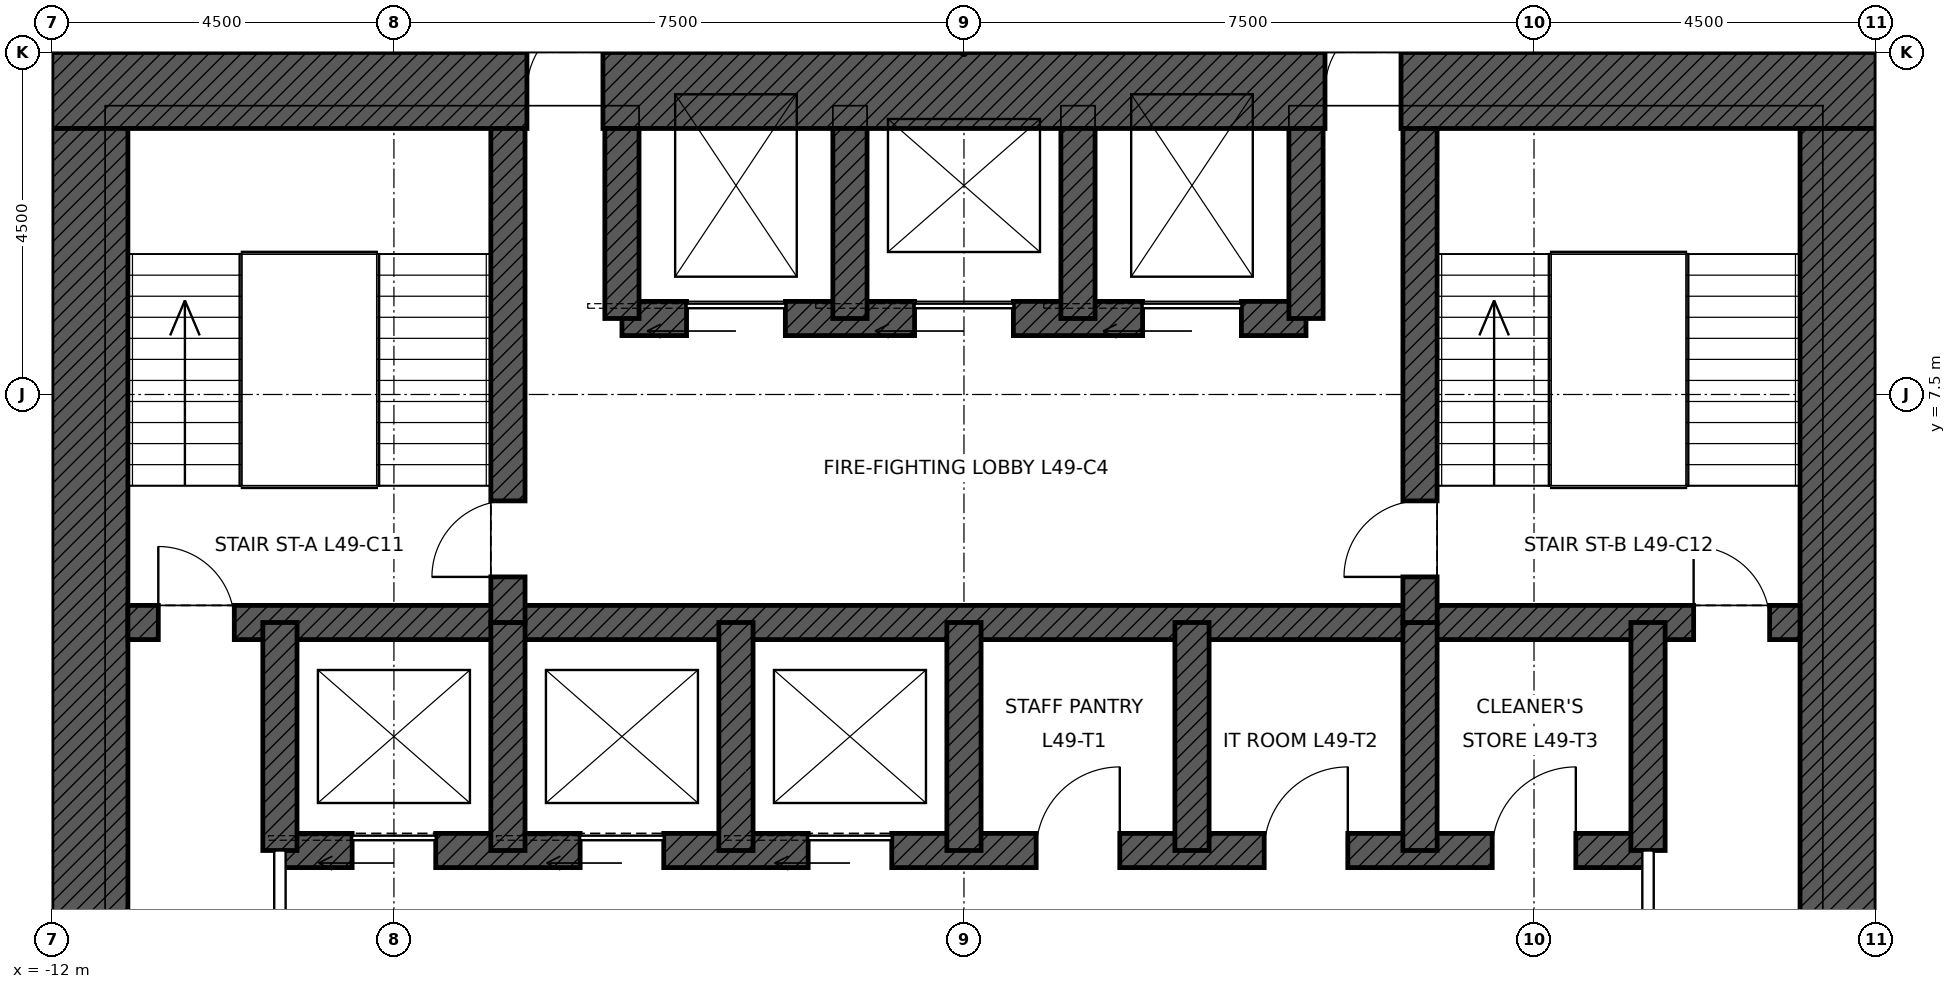
"""IFC4 building model, lengths in metres.
Left out: names, types, materials, properties, quantities, classifications, styles, units other than length and angle.
Written with IfcOpenShell. Run it as: python <this file> out.ifc"""

import sys

from ifc_helpers import new_model, si_unit, direction, frame, frame_2d, origin, place, context, subcontext, project, spatial, rectangle, extrude, element, fill, save


model = new_model("IFC4")
c1 = context("Model", 3, precision=1e-05, world=origin(), true_north=direction((0.0, 1.0)))
c2 = subcontext(c1, "Body", "Model", "MODEL_VIEW")
j1 = project(units=[si_unit("LENGTHUNIT", "METRE"), si_unit("PLANEANGLEUNIT", "RADIAN")], contexts=[c1])
p1 = place(None, origin())
s1 = spatial("IfcSite", under=j1, at=p1, CompositionType="ELEMENT")
p2 = place(p1, origin())
s2 = spatial("IfcBuilding", under=s1, at=p2, CompositionType="ELEMENT")
p3 = place(p2, frame((0.0, 0.0, 229.9)))
s3 = spatial("IfcBuildingStorey", under=s2, at=p3, CompositionType="ELEMENT", Elevation=229.9)
p4 = place(p3, frame((-12.0, 11.5, 0.0), z_axis=(0.0, 0.0, 1.0), x_axis=(1.0, 0.0, 0.0)))
e1 = element("IfcWall", 1, at=p4, inside=s3, PredefinedType="SHEAR", context=c2, shape_type="SweptSolid", body=[
    extrude(rectangle(XDim=24.0, YDim=1.0, at=frame_2d((12.0, 0.0))), origin(), (0.0, 0.0, 1.0), 4.0),
])
p5 = place(p4, frame((6.25, 0.0, 0.0)))
e2 = element("IfcOpeningElement", 2, at=p5, cuts=e1, PredefinedType="OPENING", context=c2, shape_type="SweptSolid", body=[
    extrude(rectangle(XDim=1.0, YDim=2.4, at=frame_2d((0.5, 1.2))), frame((0.0, 0.51, 0.0), z_axis=(0.0, -1.0, 0.0), x_axis=(1.0, 0.0, 0.0)), (0.0, 0.0, 1.0), 1.02),
])
p6 = place(p4, frame((16.75, 0.0, 0.0)))
e3 = element("IfcOpeningElement", 3, at=p6, cuts=e1, PredefinedType="OPENING", context=c2, shape_type="SweptSolid", body=[
    extrude(rectangle(XDim=1.0, YDim=2.4, at=frame_2d((0.5, 1.2))), frame((0.0, 0.51, 0.0), z_axis=(0.0, -1.0, 0.0), x_axis=(1.0, 0.0, 0.0)), (0.0, 0.0, 1.0), 1.02),
])
p7 = place(p3, frame((11.5, 11.0, 0.0), z_axis=(0.0, 0.0, 1.0), x_axis=(0.0, -1.0, 0.0)))
e4 = element("IfcWall", 4, at=p7, inside=s3, PredefinedType="SHEAR", context=c2, shape_type="SweptSolid", body=[
    extrude(rectangle(XDim=22.0, YDim=1.0, at=frame_2d((11.0, 0.0))), origin(), (0.0, 0.0, 1.0), 4.0),
])
p8 = place(p7, frame((10.5, 0.0, 0.0)))
e5 = element("IfcOpeningElement", 5, at=p8, cuts=e4, PredefinedType="OPENING", context=c2, shape_type="SweptSolid", body=[
    extrude(rectangle(XDim=1.0, YDim=2.4, at=frame_2d((0.5, 1.2))), frame((0.0, 0.51, 0.0), z_axis=(0.0, -1.0, 0.0), x_axis=(1.0, 0.0, 0.0)), (0.0, 0.0, 1.0), 1.02),
])
p9 = place(p3, frame((-11.5, -11.0, 0.0), z_axis=(0.0, 0.0, 1.0), x_axis=(0.0, 1.0, 0.0)))
e6 = element("IfcWall", 6, at=p9, inside=s3, PredefinedType="SHEAR", context=c2, shape_type="SweptSolid", body=[
    extrude(rectangle(XDim=22.0, YDim=1.0, at=frame_2d((11.0, 0.0))), origin(), (0.0, 0.0, 1.0), 4.0),
])
p10 = place(p9, frame((10.5, 0.0, 0.0)))
e7 = element("IfcOpeningElement", 7, at=p10, cuts=e6, PredefinedType="OPENING", context=c2, shape_type="SweptSolid", body=[
    extrude(rectangle(XDim=1.0, YDim=2.4, at=frame_2d((0.5, 1.2))), frame((0.0, 0.51, 0.0), z_axis=(0.0, -1.0, 0.0), x_axis=(1.0, 0.0, 0.0)), (0.0, 0.0, 1.0), 1.02),
])
p11 = place(p3, frame((-11.0, 4.5, 0.0), z_axis=(0.0, 0.0, 1.0), x_axis=(1.0, 0.0, 0.0)))
e8 = element("IfcWall", 8, at=p11, inside=s3, PredefinedType="SHEAR", context=c2, shape_type="SweptSolid", body=[
    extrude(rectangle(XDim=22.0, YDim=0.45, at=frame_2d((11.0, 0.0))), origin(), (0.0, 0.0, 1.0), 4.0),
])
p12 = place(p11, frame((0.4, 0.0, 0.0)))
e9 = element("IfcOpeningElement", 9, at=p12, cuts=e8, PredefinedType="OPENING", context=c2, shape_type="SweptSolid", body=[
    extrude(rectangle(XDim=1.0, YDim=2.1, at=frame_2d((0.5, 1.05))), frame((0.0, 0.235, 0.0), z_axis=(0.0, -1.0, 0.0), x_axis=(1.0, 0.0, 0.0)), (0.0, 0.0, 1.0), 0.47),
])
p13 = place(p11, frame((20.6, 0.0, 0.0)))
e10 = element("IfcOpeningElement", 10, at=p13, cuts=e8, PredefinedType="OPENING", context=c2, shape_type="SweptSolid", body=[
    extrude(rectangle(XDim=1.0, YDim=2.1, at=frame_2d((0.5, 1.05))), frame((0.0, 0.235, 0.0), z_axis=(0.0, -1.0, 0.0), x_axis=(1.0, 0.0, 0.0)), (0.0, 0.0, 1.0), 0.47),
])
p14 = place(p3, frame((-9.0, 1.5, 0.0), z_axis=(0.0, 0.0, 1.0), x_axis=(1.0, 0.0, 0.0)))
e11 = element("IfcWall", 11, at=p14, inside=s3, PredefinedType="SHEAR", context=c2, shape_type="SweptSolid", body=[
    extrude(rectangle(XDim=18.0, YDim=0.45, at=frame_2d((9.0, 0.0))), origin(), (0.0, 0.0, 1.0), 4.0),
])
p15 = place(p14, frame((0.95, 0.0, 0.0)))
e12 = element("IfcOpeningElement", 12, at=p15, cuts=e11, PredefinedType="OPENING", context=c2, shape_type="SweptSolid", body=[
    extrude(rectangle(XDim=1.1, YDim=2.1, at=frame_2d((0.55, 1.05))), frame((0.0, 0.235, 0.0), z_axis=(0.0, -1.0, 0.0), x_axis=(1.0, 0.0, 0.0)), (0.0, 0.0, 1.0), 0.47),
])
p16 = place(p14, frame((3.95, 0.0, 0.0)))
e13 = element("IfcOpeningElement", 13, at=p16, cuts=e11, PredefinedType="OPENING", context=c2, shape_type="SweptSolid", body=[
    extrude(rectangle(XDim=1.1, YDim=2.1, at=frame_2d((0.55, 1.05))), frame((0.0, 0.235, 0.0), z_axis=(0.0, -1.0, 0.0), x_axis=(1.0, 0.0, 0.0)), (0.0, 0.0, 1.0), 0.47),
])
p17 = place(p14, frame((6.95, 0.0, 0.0)))
e14 = element("IfcOpeningElement", 14, at=p17, cuts=e11, PredefinedType="OPENING", context=c2, shape_type="SweptSolid", body=[
    extrude(rectangle(XDim=1.1, YDim=2.1, at=frame_2d((0.55, 1.05))), frame((0.0, 0.235, 0.0), z_axis=(0.0, -1.0, 0.0), x_axis=(1.0, 0.0, 0.0)), (0.0, 0.0, 1.0), 0.47),
])
p18 = place(p14, frame((9.95, 0.0, 0.0)))
e15 = element("IfcOpeningElement", 15, at=p18, cuts=e11, PredefinedType="OPENING", context=c2, shape_type="SweptSolid", body=[
    extrude(rectangle(XDim=1.1, YDim=2.1, at=frame_2d((0.55, 1.05))), frame((0.0, 0.235, 0.0), z_axis=(0.0, -1.0, 0.0), x_axis=(1.0, 0.0, 0.0)), (0.0, 0.0, 1.0), 0.47),
])
p19 = place(p14, frame((12.95, 0.0, 0.0)))
e16 = element("IfcOpeningElement", 16, at=p19, cuts=e11, PredefinedType="OPENING", context=c2, shape_type="SweptSolid", body=[
    extrude(rectangle(XDim=1.1, YDim=2.1, at=frame_2d((0.55, 1.05))), frame((0.0, 0.235, 0.0), z_axis=(0.0, -1.0, 0.0), x_axis=(1.0, 0.0, 0.0)), (0.0, 0.0, 1.0), 0.47),
])
p20 = place(p14, frame((15.95, 0.0, 0.0)))
e17 = element("IfcOpeningElement", 17, at=p20, cuts=e11, PredefinedType="OPENING", context=c2, shape_type="SweptSolid", body=[
    extrude(rectangle(XDim=1.1, YDim=2.1, at=frame_2d((0.55, 1.05))), frame((0.0, 0.235, 0.0), z_axis=(0.0, -1.0, 0.0), x_axis=(1.0, 0.0, 0.0)), (0.0, 0.0, 1.0), 0.47),
])
p21 = place(p3, frame((-4.5, 8.5, 0.0), z_axis=(0.0, 0.0, 1.0), x_axis=(1.0, 0.0, 0.0)))
e18 = element("IfcWall", 18, at=p21, inside=s3, PredefinedType="SHEAR", context=c2, shape_type="SweptSolid", body=[
    extrude(rectangle(XDim=9.0, YDim=0.45, at=frame_2d((4.5, 0.0))), origin(), (0.0, 0.0, 1.0), 4.0),
])
p22 = place(p21, frame((0.85, 0.0, 0.0)))
e19 = element("IfcOpeningElement", 19, at=p22, cuts=e18, PredefinedType="OPENING", context=c2, shape_type="SweptSolid", body=[
    extrude(rectangle(XDim=1.3, YDim=2.4, at=frame_2d((0.65, 1.2))), frame((0.0, 0.235, 0.0), z_axis=(0.0, -1.0, 0.0), x_axis=(1.0, 0.0, 0.0)), (0.0, 0.0, 1.0), 0.47),
])
p23 = place(p21, frame((6.85, 0.0, 0.0)))
e20 = element("IfcOpeningElement", 20, at=p23, cuts=e18, PredefinedType="OPENING", context=c2, shape_type="SweptSolid", body=[
    extrude(rectangle(XDim=1.3, YDim=2.4, at=frame_2d((0.65, 1.2))), frame((0.0, 0.235, 0.0), z_axis=(0.0, -1.0, 0.0), x_axis=(1.0, 0.0, 0.0)), (0.0, 0.0, 1.0), 0.47),
])
p24 = place(p21, frame((3.85, 0.0, 0.0)))
e21 = element("IfcOpeningElement", 21, at=p24, cuts=e18, PredefinedType="OPENING", context=c2, shape_type="SweptSolid", body=[
    extrude(rectangle(XDim=1.3, YDim=2.4, at=frame_2d((0.65, 1.2))), frame((0.0, 0.235, 0.0), z_axis=(0.0, -1.0, 0.0), x_axis=(1.0, 0.0, 0.0)), (0.0, 0.0, 1.0), 0.47),
])
for number, where, z_axis, x_axis in (
    (22, (-9.0, 1.5, 0.0), (0.0, 0.0, 1.0), (0.0, 1.0, 0.0)),
    (23, (9.0, 1.5, 0.0), (0.0, 0.0, 1.0), (0.0, 1.0, 0.0)),
    (24, (-6.0, 1.5, 0.0), (0.0, 0.0, 1.0), (0.0, 1.0, 0.0)),
    (25, (-3.0, 1.5, 0.0), (0.0, 0.0, 1.0), (0.0, 1.0, 0.0)),
    (26, (0.0, 1.5, 0.0), (0.0, 0.0, 1.0), (0.0, 1.0, 0.0)),
    (27, (3.0, 1.5, 0.0), (0.0, 0.0, 1.0), (0.0, 1.0, 0.0)),
    (28, (6.0, 1.5, 0.0), (0.0, 0.0, 1.0), (0.0, 1.0, 0.0)),
):
    element("IfcWall", number, at=place(p3, frame(where, z_axis=z_axis, x_axis=x_axis)), inside=s3, PredefinedType="SHEAR", context=c2, shape_type="SweptSolid", body=[
        extrude(rectangle(XDim=3.0, YDim=0.45, at=frame_2d((1.5, 0.0))), origin(), (0.0, 0.0, 1.0), 4.0),
    ])
p25 = place(p3, frame((-6.0, 4.5, 0.0), z_axis=(0.0, 0.0, 1.0), x_axis=(0.0, 1.0, 0.0)))
e29 = element("IfcWall", 29, at=p25, inside=s3, PredefinedType="SHEAR", context=c2, shape_type="SweptSolid", body=[
    extrude(rectangle(XDim=6.5, YDim=0.45, at=frame_2d((3.25, 0.0))), origin(), (0.0, 0.0, 1.0), 4.0),
])
p26 = place(p25, frame((0.6, 0.0, 0.0)))
e30 = element("IfcOpeningElement", 30, at=p26, cuts=e29, PredefinedType="OPENING", context=c2, shape_type="SweptSolid", body=[
    extrude(rectangle(XDim=1.0, YDim=2.1, at=frame_2d((0.5, 1.05))), frame((0.0, 0.235, 0.0), z_axis=(0.0, -1.0, 0.0), x_axis=(1.0, 0.0, 0.0)), (0.0, 0.0, 1.0), 0.47),
])
p27 = place(p3, frame((6.0, 4.5, 0.0), z_axis=(0.0, 0.0, 1.0), x_axis=(0.0, 1.0, 0.0)))
e31 = element("IfcWall", 31, at=p27, inside=s3, PredefinedType="SHEAR", context=c2, shape_type="SweptSolid", body=[
    extrude(rectangle(XDim=6.5, YDim=0.45, at=frame_2d((3.25, 0.0))), origin(), (0.0, 0.0, 1.0), 4.0),
])
p28 = place(p27, frame((0.6, 0.0, 0.0)))
e32 = element("IfcOpeningElement", 32, at=p28, cuts=e31, PredefinedType="OPENING", context=c2, shape_type="SweptSolid", body=[
    extrude(rectangle(XDim=1.0, YDim=2.1, at=frame_2d((0.5, 1.05))), frame((0.0, 0.235, 0.0), z_axis=(0.0, -1.0, 0.0), x_axis=(1.0, 0.0, 0.0)), (0.0, 0.0, 1.0), 0.47),
])
for number, where, z_axis, x_axis in (
    (33, (-4.5, 8.5, 0.0), (0.0, 0.0, 1.0), (0.0, 1.0, 0.0)),
    (34, (4.5, 8.5, 0.0), (0.0, 0.0, 1.0), (0.0, 1.0, 0.0)),
    (35, (-1.5, 8.5, 0.0), (0.0, 0.0, 1.0), (0.0, 1.0, 0.0)),
    (36, (1.5, 8.5, 0.0), (0.0, 0.0, 1.0), (0.0, 1.0, 0.0)),
):
    element("IfcWall", number, at=place(p3, frame(where, z_axis=z_axis, x_axis=x_axis)), inside=s3, PredefinedType="SHEAR", context=c2, shape_type="SweptSolid", body=[
        extrude(rectangle(XDim=2.5, YDim=0.45, at=frame_2d((1.25, 0.0))), origin(), (0.0, 0.0, 1.0), 4.0),
    ])
p29 = place(p3, frame((-9.0, -1.5, 0.0), z_axis=(0.0, 0.0, 1.0), x_axis=(0.0, 1.0, 0.0)))
e37 = element("IfcWall", 37, at=p29, inside=s3, PredefinedType="PARTITIONING", context=c2, shape_type="SweptSolid", body=[
    extrude(rectangle(XDim=3.0, YDim=0.15, at=frame_2d((1.5, 0.0))), origin(), (0.0, 0.0, 1.0), 3.75),
])
p30 = place(p29, frame((1.0, 0.0, 0.0)))
e38 = element("IfcOpeningElement", 38, at=p30, cuts=e37, PredefinedType="OPENING", context=c2, shape_type="SweptSolid", body=[
    extrude(rectangle(XDim=1.0, YDim=2.4, at=frame_2d((0.5, 1.2))), frame((0.0, 0.085, 0.0), z_axis=(0.0, -1.0, 0.0), x_axis=(1.0, 0.0, 0.0)), (0.0, 0.0, 1.0), 0.17),
])
p31 = place(p3, frame((9.0, -1.5, 0.0), z_axis=(0.0, 0.0, 1.0), x_axis=(0.0, 1.0, 0.0)))
e39 = element("IfcWall", 39, at=p31, inside=s3, PredefinedType="PARTITIONING", context=c2, shape_type="SweptSolid", body=[
    extrude(rectangle(XDim=3.0, YDim=0.15, at=frame_2d((1.5, 0.0))), origin(), (0.0, 0.0, 1.0), 3.75),
])
p32 = place(p31, frame((1.0, 0.0, 0.0)))
e40 = element("IfcOpeningElement", 40, at=p32, cuts=e39, PredefinedType="OPENING", context=c2, shape_type="SweptSolid", body=[
    extrude(rectangle(XDim=1.0, YDim=2.4, at=frame_2d((0.5, 1.2))), frame((0.0, 0.085, 0.0), z_axis=(0.0, -1.0, 0.0), x_axis=(1.0, 0.0, 0.0)), (0.0, 0.0, 1.0), 0.17),
])
p33 = place(p12, origin())
e41 = element("IfcDoor", 41, at=p33, inside=s3, OperationType="SINGLE_SWING_LEFT", PredefinedType="DOOR", context=c2, shape_type="SweptSolid", body=[
    extrude(rectangle(XDim=1.0, YDim=2.1, at=frame_2d((0.5, 1.05))), frame((0.0, 0.025, 0.0), z_axis=(0.0, -1.0, 0.0), x_axis=(1.0, 0.0, 0.0)), (0.0, 0.0, 1.0), 0.05),
])
fill(e9, e41)
p34 = place(p13, origin())
e42 = element("IfcDoor", 42, at=p34, inside=s3, OperationType="SINGLE_SWING_LEFT", PredefinedType="DOOR", context=c2, shape_type="SweptSolid", body=[
    extrude(rectangle(XDim=1.0, YDim=2.1, at=frame_2d((0.5, 1.05))), frame((0.0, 0.025, 0.0), z_axis=(0.0, -1.0, 0.0), x_axis=(1.0, 0.0, 0.0)), (0.0, 0.0, 1.0), 0.05),
])
fill(e10, e42)
p35 = place(p26, origin())
e43 = element("IfcDoor", 43, at=p35, inside=s3, OperationType="SINGLE_SWING_LEFT", PredefinedType="DOOR", context=c2, shape_type="SweptSolid", body=[
    extrude(rectangle(XDim=1.0, YDim=2.1, at=frame_2d((0.5, 1.05))), frame((0.0, 0.025, 0.0), z_axis=(0.0, -1.0, 0.0), x_axis=(1.0, 0.0, 0.0)), (0.0, 0.0, 1.0), 0.05),
])
fill(e30, e43)
p36 = place(p28, origin())
e44 = element("IfcDoor", 44, at=p36, inside=s3, OperationType="SINGLE_SWING_LEFT", PredefinedType="DOOR", context=c2, shape_type="SweptSolid", body=[
    extrude(rectangle(XDim=1.0, YDim=2.1, at=frame_2d((0.5, 1.05))), frame((0.0, 0.025, 0.0), z_axis=(0.0, -1.0, 0.0), x_axis=(1.0, 0.0, 0.0)), (0.0, 0.0, 1.0), 0.05),
])
fill(e32, e44)
p37 = place(p5, origin())
e45 = element("IfcDoor", 45, at=p37, inside=s3, OperationType="SINGLE_SWING_RIGHT", PredefinedType="DOOR", context=c2, shape_type="SweptSolid", body=[
    extrude(rectangle(XDim=1.0, YDim=2.4, at=frame_2d((0.5, 1.2))), frame((0.0, 0.485, 0.0), z_axis=(0.0, -1.0, 0.0), x_axis=(1.0, 0.0, 0.0)), (0.0, 0.0, 1.0), 0.05),
])
fill(e2, e45)
p38 = place(p6, origin())
e46 = element("IfcDoor", 46, at=p38, inside=s3, OperationType="SINGLE_SWING_RIGHT", PredefinedType="DOOR", context=c2, shape_type="SweptSolid", body=[
    extrude(rectangle(XDim=1.0, YDim=2.4, at=frame_2d((0.5, 1.2))), frame((0.0, 0.485, 0.0), z_axis=(0.0, -1.0, 0.0), x_axis=(1.0, 0.0, 0.0)), (0.0, 0.0, 1.0), 0.05),
])
fill(e3, e46)
p39 = place(p22, origin())
e47 = element("IfcDoor", 47, at=p39, inside=s3, OperationType="SLIDING_TO_LEFT", PredefinedType="DOOR", context=c2, shape_type="SweptSolid", body=[
    extrude(rectangle(XDim=1.3, YDim=2.4, at=frame_2d((0.65, 1.2))), frame((0.0, 0.025, 0.0), z_axis=(0.0, -1.0, 0.0), x_axis=(1.0, 0.0, 0.0)), (0.0, 0.0, 1.0), 0.05),
])
fill(e19, e47)
p40 = place(p23, origin())
e48 = element("IfcDoor", 48, at=p40, inside=s3, OperationType="SLIDING_TO_LEFT", PredefinedType="DOOR", context=c2, shape_type="SweptSolid", body=[
    extrude(rectangle(XDim=1.3, YDim=2.4, at=frame_2d((0.65, 1.2))), frame((0.0, 0.025, 0.0), z_axis=(0.0, -1.0, 0.0), x_axis=(1.0, 0.0, 0.0)), (0.0, 0.0, 1.0), 0.05),
])
fill(e20, e48)
p41 = place(p24, origin())
e49 = element("IfcDoor", 49, at=p41, inside=s3, OperationType="SLIDING_TO_LEFT", PredefinedType="DOOR", context=c2, shape_type="SweptSolid", body=[
    extrude(rectangle(XDim=1.3, YDim=2.4, at=frame_2d((0.65, 1.2))), frame((0.0, 0.025, 0.0), z_axis=(0.0, -1.0, 0.0), x_axis=(1.0, 0.0, 0.0)), (0.0, 0.0, 1.0), 0.05),
])
fill(e21, e49)
p42 = place(p15, origin())
e50 = element("IfcDoor", 50, at=p42, inside=s3, OperationType="SLIDING_TO_LEFT", PredefinedType="DOOR", context=c2, shape_type="SweptSolid", body=[
    extrude(rectangle(XDim=1.1, YDim=2.1, at=frame_2d((0.55, 1.05))), frame((0.0, 0.025, 0.0), z_axis=(0.0, -1.0, 0.0), x_axis=(1.0, 0.0, 0.0)), (0.0, 0.0, 1.0), 0.05),
])
fill(e12, e50)
p43 = place(p16, origin())
e51 = element("IfcDoor", 51, at=p43, inside=s3, OperationType="SLIDING_TO_LEFT", PredefinedType="DOOR", context=c2, shape_type="SweptSolid", body=[
    extrude(rectangle(XDim=1.1, YDim=2.1, at=frame_2d((0.55, 1.05))), frame((0.0, 0.025, 0.0), z_axis=(0.0, -1.0, 0.0), x_axis=(1.0, 0.0, 0.0)), (0.0, 0.0, 1.0), 0.05),
])
fill(e13, e51)
p44 = place(p17, origin())
e52 = element("IfcDoor", 52, at=p44, inside=s3, OperationType="SLIDING_TO_LEFT", PredefinedType="DOOR", context=c2, shape_type="SweptSolid", body=[
    extrude(rectangle(XDim=1.1, YDim=2.1, at=frame_2d((0.55, 1.05))), frame((0.0, 0.025, 0.0), z_axis=(0.0, -1.0, 0.0), x_axis=(1.0, 0.0, 0.0)), (0.0, 0.0, 1.0), 0.05),
])
fill(e14, e52)
p45 = place(p18, origin())
e53 = element("IfcDoor", 53, at=p45, inside=s3, OperationType="SINGLE_SWING_RIGHT", PredefinedType="DOOR", context=c2, shape_type="SweptSolid", body=[
    extrude(rectangle(XDim=1.1, YDim=2.1, at=frame_2d((0.55, 1.05))), frame((0.0, 0.025, 0.0), z_axis=(0.0, -1.0, 0.0), x_axis=(1.0, 0.0, 0.0)), (0.0, 0.0, 1.0), 0.05),
])
fill(e15, e53)
p46 = place(p19, origin())
e54 = element("IfcDoor", 54, at=p46, inside=s3, OperationType="SINGLE_SWING_RIGHT", PredefinedType="DOOR", context=c2, shape_type="SweptSolid", body=[
    extrude(rectangle(XDim=1.1, YDim=2.1, at=frame_2d((0.55, 1.05))), frame((0.0, 0.025, 0.0), z_axis=(0.0, -1.0, 0.0), x_axis=(1.0, 0.0, 0.0)), (0.0, 0.0, 1.0), 0.05),
])
fill(e16, e54)
p47 = place(p20, origin())
e55 = element("IfcDoor", 55, at=p47, inside=s3, OperationType="SINGLE_SWING_RIGHT", PredefinedType="DOOR", context=c2, shape_type="SweptSolid", body=[
    extrude(rectangle(XDim=1.1, YDim=2.1, at=frame_2d((0.55, 1.05))), frame((0.0, 0.025, 0.0), z_axis=(0.0, -1.0, 0.0), x_axis=(1.0, 0.0, 0.0)), (0.0, 0.0, 1.0), 0.05),
])
fill(e17, e55)
save(model, sys.argv[1])
